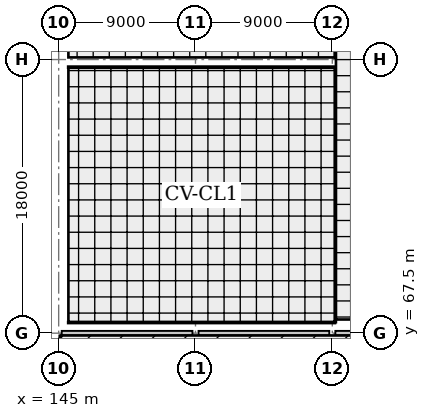
"""IFC4 building model, lengths in metres.
Left out: names, types, materials, properties, quantities, classifications, styles, units other than length and angle.
Written with IfcOpenShell. Run it as: python <this file> out.ifc"""

import sys

from ifc_helpers import new_model, si_unit, direction, frame, frame_2d, origin, origin_2d, place, context, subcontext, project, spatial, rectangle, i_section, extrude, element, fill, save


model = new_model("IFC4")
c1 = context("Model", 3, precision=1e-05, world=origin(), true_north=direction((0.0, 1.0)))
c2 = subcontext(c1, "Body", "Model", "MODEL_VIEW")
j1 = project(units=[si_unit("LENGTHUNIT", "METRE"), si_unit("PLANEANGLEUNIT", "RADIAN")], contexts=[c1])
p1 = place(None, origin())
s1 = spatial("IfcSite", under=j1, at=p1, CompositionType="ELEMENT")
p2 = place(p1, origin())
s2 = spatial("IfcBuilding", under=s1, at=p2, CompositionType="ELEMENT")
p3 = place(p2, frame((0.0, 0.0, 10.8)))
s3 = spatial("IfcBuildingStorey", under=s2, at=p3, CompositionType="ELEMENT", Elevation=10.8)
for number, where, z_axis, x_axis in (
    (1, (145.0, 67.5, 0.0), (0.0, 0.0, 1.0), (1.0, 0.0, 0.0)),
    (2, (145.0, 76.5, 0.0), (0.0, 0.0, 1.0), (1.0, 0.0, 0.0)),
    (3, (145.0, 85.5, 0.0), (0.0, 0.0, 1.0), (1.0, 0.0, 0.0)),
    (4, (154.0, 67.5, 0.0), (0.0, 0.0, 1.0), (1.0, 0.0, 0.0)),
    (5, (154.0, 76.5, 0.0), (0.0, 0.0, 1.0), (1.0, 0.0, 0.0)),
    (6, (154.0, 85.5, 0.0), (0.0, 0.0, 1.0), (1.0, 0.0, 0.0)),
    (7, (163.0, 67.5, 0.0), (0.0, 0.0, 1.0), (1.0, 0.0, 0.0)),
    (8, (163.0, 76.5, 0.0), (0.0, 0.0, 1.0), (1.0, 0.0, 0.0)),
    (9, (163.0, 85.5, 0.0), (0.0, 0.0, 1.0), (1.0, 0.0, 0.0)),
):
    element("IfcColumn", number, at=place(p3, frame(where, z_axis=z_axis, x_axis=x_axis)), inside=s3, PredefinedType="COLUMN", context=c2, shape_type="SweptSolid", body=[
        extrude(i_section(OverallWidth=0.4, OverallDepth=0.408, WebThickness=0.021, FlangeThickness=0.021, FilletRadius=0.022, at=origin_2d()), origin(), (0.0, 0.0, 1.0), 3.6),
    ])
p4 = place(p3, frame((171.8, 67.5, 0.0), z_axis=(0.0, 0.0, 1.0), x_axis=(-1.0, 0.0, 0.0)))
e10 = element("IfcWall", 10, at=p4, inside=s3, PredefinedType="SOLIDWALL", context=c2, shape_type="SweptSolid", body=[
    extrude(rectangle(XDim=8.6, YDim=0.3, at=frame_2d((4.3, 0.0))), origin(), (0.0, 0.0, 1.0), 2.915),
])
p5 = place(p4, frame((1.515, 0.0, 0.9)))
e11 = element("IfcOpeningElement", 11, at=p5, cuts=e10, PredefinedType="OPENING", context=c2, shape_type="SweptSolid", body=[
    extrude(rectangle(XDim=1.5, YDim=1.6, at=frame_2d((0.75, 0.8))), frame((0.0, 0.16, 0.0), z_axis=(0.0, -1.0, 0.0), x_axis=(1.0, 0.0, 0.0)), (0.0, 0.0, 1.0), 0.32),
])
p6 = place(p4, frame((5.735, 0.0, 0.9)))
e12 = element("IfcOpeningElement", 12, at=p6, cuts=e10, PredefinedType="OPENING", context=c2, shape_type="SweptSolid", body=[
    extrude(rectangle(XDim=1.2, YDim=1.6, at=frame_2d((0.6, 0.8))), frame((0.0, 0.16, 0.0), z_axis=(0.0, -1.0, 0.0), x_axis=(1.0, 0.0, 0.0)), (0.0, 0.0, 1.0), 0.32),
])
p7 = place(p3, frame((162.8, 67.5, 0.0), z_axis=(0.0, 0.0, 1.0), x_axis=(-1.0, 0.0, 0.0)))
e13 = element("IfcWall", 13, at=p7, inside=s3, PredefinedType="SOLIDWALL", context=c2, shape_type="SweptSolid", body=[
    extrude(rectangle(XDim=8.6, YDim=0.3, at=frame_2d((4.3, 0.0))), origin(), (0.0, 0.0, 1.0), 2.915),
])
p8 = place(p7, frame((1.665, 0.0, 0.9)))
e14 = element("IfcOpeningElement", 14, at=p8, cuts=e13, PredefinedType="OPENING", context=c2, shape_type="SweptSolid", body=[
    extrude(rectangle(XDim=1.2, YDim=1.6, at=frame_2d((0.6, 0.8))), frame((0.0, 0.16, 0.0), z_axis=(0.0, -1.0, 0.0), x_axis=(1.0, 0.0, 0.0)), (0.0, 0.0, 1.0), 0.32),
])
p9 = place(p7, frame((5.135, 0.0, 0.9)))
e15 = element("IfcOpeningElement", 15, at=p9, cuts=e13, PredefinedType="OPENING", context=c2, shape_type="SweptSolid", body=[
    extrude(rectangle(XDim=2.4, YDim=1.5, at=frame_2d((1.2, 0.75))), frame((0.0, 0.16, 0.0), z_axis=(0.0, -1.0, 0.0), x_axis=(1.0, 0.0, 0.0)), (0.0, 0.0, 1.0), 0.32),
])
p10 = place(p3, frame((153.8, 67.5, 0.0), z_axis=(0.0, 0.0, 1.0), x_axis=(-1.0, 0.0, 0.0)))
e16 = element("IfcWall", 16, at=p10, inside=s3, PredefinedType="SOLIDWALL", context=c2, shape_type="SweptSolid", body=[
    extrude(rectangle(XDim=8.6, YDim=0.3, at=frame_2d((4.3, 0.0))), origin(), (0.0, 0.0, 1.0), 2.915),
])
p11 = place(p10, frame((1.065, 0.0, 0.9)))
e17 = element("IfcOpeningElement", 17, at=p11, cuts=e16, PredefinedType="OPENING", context=c2, shape_type="SweptSolid", body=[
    extrude(rectangle(XDim=2.4, YDim=1.5, at=frame_2d((1.2, 0.75))), frame((0.0, 0.16, 0.0), z_axis=(0.0, -1.0, 0.0), x_axis=(1.0, 0.0, 0.0)), (0.0, 0.0, 1.0), 0.32),
])
p12 = place(p10, frame((5.435, 0.0, 0.9)))
e18 = element("IfcOpeningElement", 18, at=p12, cuts=e16, PredefinedType="OPENING", context=c2, shape_type="SweptSolid", body=[
    extrude(rectangle(XDim=1.8, YDim=1.5, at=frame_2d((0.9, 0.75))), frame((0.0, 0.16, 0.0), z_axis=(0.0, -1.0, 0.0), x_axis=(1.0, 0.0, 0.0)), (0.0, 0.0, 1.0), 0.32),
])
p13 = place(p3, frame((145.15, 54.15, 0.0), z_axis=(0.0, 0.0, 1.0), x_axis=(0.0, 1.0, 0.0)))
e19 = element("IfcWall", 19, at=p13, inside=s3, PredefinedType="PARAPET", context=c2, shape_type="SweptSolid", body=[
    extrude(rectangle(XDim=13.2, YDim=0.21, at=frame_2d((6.6, 0.0))), origin(), (0.0, 0.0, 1.0), 1.2),
])
for number, where, z_axis, x_axis in (
    (20, (163.2, 68.2, 0.0), (0.0, 0.0, 1.0), (-1.0, 0.0, 0.0)),
    (21, (145.6, 85.0, 0.0), (0.0, 0.0, 1.0), (1.0, 0.0, 0.0)),
):
    element("IfcWall", number, at=place(p3, frame(where, z_axis=z_axis, x_axis=x_axis)), inside=s3, PredefinedType="PARTITIONING", context=c2, shape_type="SweptSolid", body=[
        extrude(rectangle(XDim=17.6, YDim=0.12, at=frame_2d((8.8, 0.0))), origin(), (0.0, 0.0, 1.0), 2.915),
    ])
p14 = place(p3, frame((163.2, 85.0, 0.0), z_axis=(0.0, 0.0, 1.0), x_axis=(0.0, -1.0, 0.0)))
e22 = element("IfcWall", 22, at=p14, inside=s3, PredefinedType="PARTITIONING", context=c2, shape_type="SweptSolid", body=[
    extrude(rectangle(XDim=16.8, YDim=0.12, at=frame_2d((8.4, 0.0))), origin(), (0.0, 0.0, 1.0), 2.915),
])
p15 = place(p14, frame((9.375, 0.0, 0.0)))
e23 = element("IfcOpeningElement", 23, at=p15, cuts=e22, PredefinedType="OPENING", context=c2, shape_type="SweptSolid", body=[
    extrude(rectangle(XDim=1.25, YDim=2.1, at=frame_2d((0.625, 1.05))), frame((0.0, 0.07, 0.0), z_axis=(0.0, -1.0, 0.0), x_axis=(1.0, 0.0, 0.0)), (0.0, 0.0, 1.0), 0.14),
])
p16 = place(p3, frame((163.2, 95.8, 0.0), z_axis=(0.0, 0.0, 1.0), x_axis=(0.0, -1.0, 0.0)))
e24 = element("IfcWall", 24, at=p16, inside=s3, PredefinedType="PARTITIONING", context=c2, shape_type="SweptSolid", body=[
    extrude(rectangle(XDim=10.2, YDim=0.11, at=frame_2d((5.1, 0.0))), origin(), (0.0, 0.0, 1.0), 2.915),
])
p17 = place(p16, frame((4.525, 0.0, 0.0)))
e25 = element("IfcOpeningElement", 25, at=p17, cuts=e24, PredefinedType="OPENING", context=c2, shape_type="SweptSolid", body=[
    extrude(rectangle(XDim=1.15, YDim=2.1, at=frame_2d((0.575, 1.05))), frame((0.0, 0.065, 0.0), z_axis=(0.0, -1.0, 0.0), x_axis=(1.0, 0.0, 0.0)), (0.0, 0.0, 1.0), 0.13),
])
p18 = place(p8, origin())
e26 = element("IfcWindow", 26, at=p18, inside=s3, PartitioningType="SINGLE_PANEL", PredefinedType="WINDOW", context=c2, shape_type="SweptSolid", body=[
    extrude(rectangle(XDim=1.2, YDim=1.6, at=frame_2d((0.6, 0.8))), frame((0.0, 0.03, 0.0), z_axis=(0.0, -1.0, 0.0), x_axis=(1.0, 0.0, 0.0)), (0.0, 0.0, 1.0), 0.06),
])
fill(e14, e26)
p19 = place(p9, origin())
e27 = element("IfcWindow", 27, at=p19, inside=s3, PartitioningType="SINGLE_PANEL", PredefinedType="WINDOW", context=c2, shape_type="SweptSolid", body=[
    extrude(rectangle(XDim=2.4, YDim=1.5, at=frame_2d((1.2, 0.75))), frame((0.0, 0.03, 0.0), z_axis=(0.0, -1.0, 0.0), x_axis=(1.0, 0.0, 0.0)), (0.0, 0.0, 1.0), 0.06),
])
fill(e15, e27)
p20 = place(p11, origin())
e28 = element("IfcWindow", 28, at=p20, inside=s3, PartitioningType="SINGLE_PANEL", PredefinedType="WINDOW", context=c2, shape_type="SweptSolid", body=[
    extrude(rectangle(XDim=2.4, YDim=1.5, at=frame_2d((1.2, 0.75))), frame((0.0, 0.03, 0.0), z_axis=(0.0, -1.0, 0.0), x_axis=(1.0, 0.0, 0.0)), (0.0, 0.0, 1.0), 0.06),
])
fill(e17, e28)
p21 = place(p12, origin())
e29 = element("IfcWindow", 29, at=p21, inside=s3, PartitioningType="SINGLE_PANEL", PredefinedType="WINDOW", context=c2, shape_type="SweptSolid", body=[
    extrude(rectangle(XDim=1.8, YDim=1.5, at=frame_2d((0.9, 0.75))), frame((0.0, 0.03, 0.0), z_axis=(0.0, -1.0, 0.0), x_axis=(1.0, 0.0, 0.0)), (0.0, 0.0, 1.0), 0.06),
])
fill(e18, e29)
p22 = place(p15, origin())
e30 = element("IfcDoor", 30, at=p22, inside=s3, OperationType="SINGLE_SWING_LEFT", PredefinedType="DOOR", context=c2, shape_type="SweptSolid", body=[
    extrude(rectangle(XDim=1.25, YDim=2.1, at=frame_2d((0.625, 1.05))), frame((0.0, 0.025, 0.0), z_axis=(0.0, -1.0, 0.0), x_axis=(1.0, 0.0, 0.0)), (0.0, 0.0, 1.0), 0.05),
])
fill(e23, e30)
save(model, sys.argv[1])
